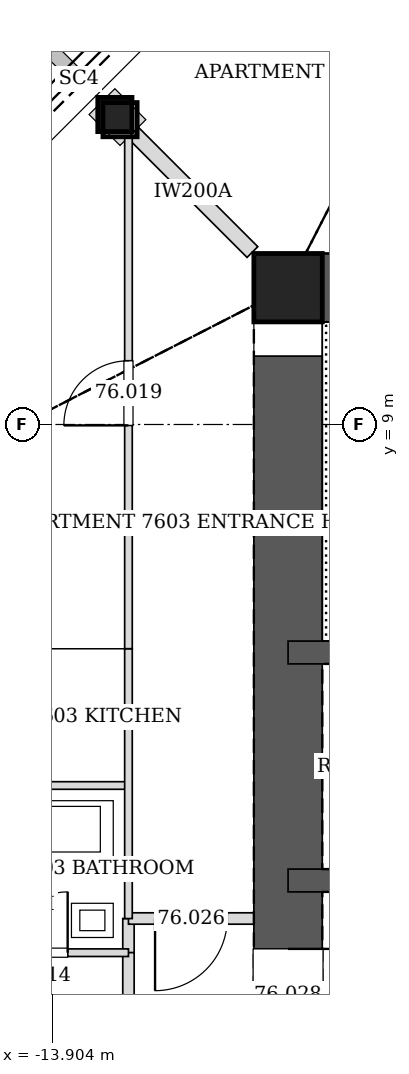
"""IFC4 building model, lengths in metres.
Left out: names, types, materials, properties, quantities, classifications, styles, units other than length and angle.
Written with IfcOpenShell. Run it as: python <this file> out.ifc"""

import sys

from ifc_helpers import new_model, si_unit, direction, frame, frame_2d, origin, origin_2d, place, context, subcontext, project, spatial, rectangle, hollow_rectangle, extrude, element, fill, save


model = new_model("IFC4")
c1 = context("Model", 3, precision=1e-05, world=origin(), true_north=direction((0.0, 1.0)))
c2 = subcontext(c1, "Body", "Model", "MODEL_VIEW")
j1 = project(units=[si_unit("LENGTHUNIT", "METRE"), si_unit("PLANEANGLEUNIT", "RADIAN")], contexts=[c1])
p1 = place(None, origin())
s1 = spatial("IfcSite", under=j1, at=p1, CompositionType="ELEMENT")
p2 = place(p1, origin())
s2 = spatial("IfcBuilding", under=s1, at=p2, CompositionType="ELEMENT")
p3 = place(p2, frame((0.0, 0.0, 308.2)))
s3 = spatial("IfcBuildingStorey", under=s2, at=p3, CompositionType="ELEMENT", Elevation=308.2)
p4 = place(p3, frame((-13.079, 13.079, 0.0), z_axis=(0.020024994503, -0.020024994503, 0.999598919162), x_axis=(0.707106781187, 0.707106781187, 0.0)))
e1 = element("IfcColumn", 1, at=p4, inside=s3, PredefinedType="COLUMN", context=c2, shape_type="SweptSolid", body=[
    extrude(hollow_rectangle(XDim=0.45, YDim=0.45, WallThickness=0.02, at=origin_2d()), origin(), (0.0, 0.0, 1.0), 3.402),
])
p5 = place(p3, frame((-10.8, 10.8, 0.0), z_axis=(0.0, 0.0, 1.0), x_axis=(1.0, 0.0, 0.0)))
e2 = element("IfcColumn", 2, at=p5, inside=s3, PredefinedType="COLUMN", context=c2, shape_type="SweptSolid", body=[
    extrude(hollow_rectangle(XDim=0.9, YDim=0.9, WallThickness=0.04, at=origin_2d()), origin(), (0.0, 0.0, 1.0), 3.4),
])
p6 = place(p3, frame((10.8, 10.8, 0.0), z_axis=(0.0, 0.0, 1.0), x_axis=(-1.0, 0.0, 0.0)))
e3 = element("IfcWall", 3, at=p6, inside=s3, PredefinedType="SOLIDWALL", context=c2, shape_type="SweptSolid", body=[
    extrude(rectangle(XDim=21.6, YDim=0.9, at=frame_2d((10.8, 0.0))), origin(), (0.0, 0.0, 1.0), 3.4),
])
p7 = place(p6, frame((10.05, 0.0, 0.0)))
e4 = element("IfcOpeningElement", 4, at=p7, cuts=e3, PredefinedType="OPENING", context=c2, shape_type="SweptSolid", body=[
    extrude(rectangle(XDim=1.5, YDim=2.1, at=frame_2d((0.75, 1.05))), frame((0.0, 0.46, 0.0), z_axis=(0.0, -1.0, 0.0), x_axis=(1.0, 0.0, 0.0)), (0.0, 0.0, 1.0), 0.92),
])
p8 = place(p3, frame((-10.8, 10.8, 0.0), z_axis=(0.0, 0.0, 1.0), x_axis=(0.0, -1.0, 0.0)))
e5 = element("IfcWall", 5, at=p8, inside=s3, PredefinedType="SOLIDWALL", context=c2, shape_type="SweptSolid", body=[
    extrude(rectangle(XDim=21.6, YDim=0.9, at=frame_2d((10.8, 0.0))), origin(), (0.0, 0.0, 1.0), 3.4),
])
p9 = place(p8, frame((8.7, 0.0, 0.0)))
e6 = element("IfcOpeningElement", 6, at=p9, cuts=e5, PredefinedType="OPENING", context=c2, shape_type="SweptSolid", body=[
    extrude(rectangle(XDim=1.2, YDim=2.1, at=frame_2d((0.6, 1.05))), frame((0.0, 0.46, 0.0), z_axis=(0.0, -1.0, 0.0), x_axis=(1.0, 0.0, 0.0)), (0.0, 0.0, 1.0), 0.92),
])
p10 = place(p8, frame((11.7, 0.0, 0.0)))
e7 = element("IfcOpeningElement", 7, at=p10, cuts=e5, PredefinedType="OPENING", context=c2, shape_type="SweptSolid", body=[
    extrude(rectangle(XDim=1.2, YDim=2.1, at=frame_2d((0.6, 1.05))), frame((0.0, 0.46, 0.0), z_axis=(0.0, -1.0, 0.0), x_axis=(1.0, 0.0, 0.0)), (0.0, 0.0, 1.0), 0.92),
])
p11 = place(p3, frame((-10.8, 3.0, 0.0), z_axis=(0.0, 0.0, 1.0), x_axis=(1.0, 0.0, 0.0)))
e8 = element("IfcWall", 8, at=p11, inside=s3, PredefinedType="SOLIDWALL", context=c2, shape_type="SweptSolid", body=[
    extrude(rectangle(XDim=21.6, YDim=0.3, at=frame_2d((10.8, 0.0))), origin(), (0.0, 0.0, 1.0), 3.4),
])
p12 = place(p11, frame((1.65, 0.0, 0.0)))
e9 = element("IfcOpeningElement", 9, at=p12, cuts=e8, PredefinedType="OPENING", context=c2, shape_type="SweptSolid", body=[
    extrude(rectangle(XDim=0.9, YDim=2.1, at=frame_2d((0.45, 1.05))), frame((0.0, 0.16, 0.0), z_axis=(0.0, -1.0, 0.0), x_axis=(1.0, 0.0, 0.0)), (0.0, 0.0, 1.0), 0.32),
])
p13 = place(p11, frame((4.55, 0.0, 0.0)))
e10 = element("IfcOpeningElement", 10, at=p13, cuts=e8, PredefinedType="OPENING", context=c2, shape_type="SweptSolid", body=[
    extrude(rectangle(XDim=0.9, YDim=2.1, at=frame_2d((0.45, 1.05))), frame((0.0, 0.16, 0.0), z_axis=(0.0, -1.0, 0.0), x_axis=(1.0, 0.0, 0.0)), (0.0, 0.0, 1.0), 0.32),
])
p14 = place(p11, frame((7.45, 0.0, 0.0)))
e11 = element("IfcOpeningElement", 11, at=p14, cuts=e8, PredefinedType="OPENING", context=c2, shape_type="SweptSolid", body=[
    extrude(rectangle(XDim=0.9, YDim=2.1, at=frame_2d((0.45, 1.05))), frame((0.0, 0.16, 0.0), z_axis=(0.0, -1.0, 0.0), x_axis=(1.0, 0.0, 0.0)), (0.0, 0.0, 1.0), 0.32),
])
p15 = place(p11, frame((13.25, 0.0, 0.0)))
e12 = element("IfcOpeningElement", 12, at=p15, cuts=e8, PredefinedType="OPENING", context=c2, shape_type="SweptSolid", body=[
    extrude(rectangle(XDim=0.9, YDim=2.1, at=frame_2d((0.45, 1.05))), frame((0.0, 0.16, 0.0), z_axis=(0.0, -1.0, 0.0), x_axis=(1.0, 0.0, 0.0)), (0.0, 0.0, 1.0), 0.32),
])
p16 = place(p11, frame((16.15, 0.0, 0.0)))
e13 = element("IfcOpeningElement", 13, at=p16, cuts=e8, PredefinedType="OPENING", context=c2, shape_type="SweptSolid", body=[
    extrude(rectangle(XDim=0.9, YDim=2.1, at=frame_2d((0.45, 1.05))), frame((0.0, 0.16, 0.0), z_axis=(0.0, -1.0, 0.0), x_axis=(1.0, 0.0, 0.0)), (0.0, 0.0, 1.0), 0.32),
])
p17 = place(p11, frame((19.05, 0.0, 0.0)))
e14 = element("IfcOpeningElement", 14, at=p17, cuts=e8, PredefinedType="OPENING", context=c2, shape_type="SweptSolid", body=[
    extrude(rectangle(XDim=0.9, YDim=2.1, at=frame_2d((0.45, 1.05))), frame((0.0, 0.16, 0.0), z_axis=(0.0, -1.0, 0.0), x_axis=(1.0, 0.0, 0.0)), (0.0, 0.0, 1.0), 0.32),
])
p18 = place(p3, frame((-10.8, 6.0, 0.0), z_axis=(0.0, 0.0, 1.0), x_axis=(1.0, 0.0, 0.0)))
e15 = element("IfcWall", 15, at=p18, inside=s3, PredefinedType="SOLIDWALL", context=c2, shape_type="SweptSolid", body=[
    extrude(rectangle(XDim=21.6, YDim=0.3, at=frame_2d((10.8, 0.0))), origin(), (0.0, 0.0, 1.0), 3.4),
])
p19 = place(p18, frame((10.25, 0.0, 0.0)))
e16 = element("IfcOpeningElement", 16, at=p19, cuts=e15, PredefinedType="OPENING", context=c2, shape_type="SweptSolid", body=[
    extrude(rectangle(XDim=1.1, YDim=2.1, at=frame_2d((0.55, 1.05))), frame((0.0, 0.16, 0.0), z_axis=(0.0, -1.0, 0.0), x_axis=(1.0, 0.0, 0.0)), (0.0, 0.0, 1.0), 0.32),
])
p20 = place(p3, frame((-12.9, 2.5, 0.0), z_axis=(0.0, 0.0, 1.0), x_axis=(0.0, -1.0, 0.0)))
e17 = element("IfcWall", 17, at=p20, inside=s3, PredefinedType="PARTITIONING", context=c2, shape_type="SweptSolid", body=[
    extrude(rectangle(XDim=0.451, YDim=0.15, at=frame_2d((0.226, 0.0))), origin(), (0.0, 0.0, 1.0), 3.2),
])
p21 = place(p3, frame((-12.9, 2.051, 0.0), z_axis=(0.0, 0.0, 1.0), x_axis=(0.0, -1.0, 0.0)))
e18 = element("IfcWall", 18, at=p21, inside=s3, PredefinedType="PARTITIONING", context=c2, shape_type="SweptSolid", body=[
    extrude(rectangle(XDim=1.869, YDim=0.15, at=frame_2d((0.934, 0.0))), origin(), (0.0, 0.0, 1.0), 3.2),
])
p22 = place(p3, frame((-11.25, 2.5, 0.0), z_axis=(0.0, 0.0, 1.0), x_axis=(-1.0, 0.0, 0.0)))
e19 = element("IfcWall", 19, at=p22, inside=s3, PredefinedType="PARTITIONING", context=c2, shape_type="SweptSolid", body=[
    extrude(rectangle(XDim=1.65, YDim=0.15, at=frame_2d((0.825, 0.0))), origin(), (0.0, 0.0, 1.0), 3.2),
])
p23 = place(p22, frame((0.35, 0.0, 0.0)))
e20 = element("IfcOpeningElement", 20, at=p23, cuts=e19, PredefinedType="OPENING", context=c2, shape_type="SweptSolid", body=[
    extrude(rectangle(XDim=0.95, YDim=2.1, at=frame_2d((0.475, 1.05))), frame((0.0, 0.085, 0.0), z_axis=(0.0, -1.0, 0.0), x_axis=(1.0, 0.0, 0.0)), (0.0, 0.0, 1.0), 0.17),
])
p24 = place(p3, frame((-12.838, 12.838, 0.0), z_axis=(0.0, 0.0, 1.0), x_axis=(0.707106781187, -0.707106781187, 0.0)))
e21 = element("IfcWall", 21, at=p24, inside=s3, PredefinedType="PARTITIONING", context=c2, shape_type="SweptSolid", body=[
    extrude(rectangle(XDim=2.219, YDim=0.2, at=frame_2d((1.109, 0.0))), origin(), (0.0, 0.0, 1.0), 2.591),
])
p25 = place(p3, frame((-15.3, 4.25, 0.0), z_axis=(0.0, 0.0, 1.0), x_axis=(1.0, 0.0, 0.0)))
e22 = element("IfcWall", 22, at=p25, inside=s3, PredefinedType="PARTITIONING", context=c2, shape_type="SweptSolid", body=[
    extrude(rectangle(XDim=2.4, YDim=0.1, at=frame_2d((1.2, 0.0))), origin(), (0.0, 0.0, 1.0), 2.588),
])
p26 = place(p3, frame((-12.9, 6.05, 0.0), z_axis=(0.0, 0.0, 1.0), x_axis=(0.0, -1.0, 0.0)))
e23 = element("IfcWall", 23, at=p26, inside=s3, PredefinedType="PARTITIONING", context=c2, shape_type="SweptSolid", body=[
    extrude(rectangle(XDim=3.551, YDim=0.1, at=frame_2d((1.775, 0.0))), origin(), (0.0, 0.0, 1.0), 3.2),
])
p27 = place(p3, frame((-15.3, 2.05, 0.0), z_axis=(0.0, 0.0, 1.0), x_axis=(1.0, 0.0, 0.0)))
e24 = element("IfcWall", 24, at=p27, inside=s3, PredefinedType="PARTITIONING", context=c2, shape_type="SweptSolid", body=[
    extrude(rectangle(XDim=2.4, YDim=0.1, at=frame_2d((1.2, 0.0))), origin(), (0.0, 0.0, 1.0), 2.588),
])
p28 = place(p27, frame((0.8, 0.0, 0.0)))
e25 = element("IfcOpeningElement", 25, at=p28, cuts=e24, PredefinedType="OPENING", context=c2, shape_type="SweptSolid", body=[
    extrude(rectangle(XDim=0.8, YDim=2.1, at=frame_2d((0.4, 1.05))), frame((0.0, 0.06, 0.0), z_axis=(0.0, -1.0, 0.0), x_axis=(1.0, 0.0, 0.0)), (0.0, 0.0, 1.0), 0.12),
])
p29 = place(p3, frame((-12.9, 6.05, 0.0), z_axis=(0.0, 0.0, 1.0), x_axis=(0.0, 1.0, 0.0)))
e26 = element("IfcWall", 26, at=p29, inside=s3, PredefinedType="PARTITIONING", context=c2, shape_type="SweptSolid", body=[
    extrude(rectangle(XDim=6.726, YDim=0.1, at=frame_2d((3.363, 0.0))), origin(), (0.0, 0.0, 1.0), 2.349),
])
p30 = place(p29, frame((2.938, 0.0, 0.0)))
e27 = element("IfcOpeningElement", 27, at=p30, cuts=e26, PredefinedType="OPENING", context=c2, shape_type="SweptSolid", body=[
    extrude(rectangle(XDim=0.85, YDim=2.1, at=frame_2d((0.425, 1.05))), frame((0.0, 0.06, 0.0), z_axis=(0.0, -1.0, 0.0), x_axis=(1.0, 0.0, 0.0)), (0.0, 0.0, 1.0), 0.12),
])
p31 = place(p28, origin())
e28 = element("IfcDoor", 28, at=p31, inside=s3, OperationType="SINGLE_SWING_RIGHT", PredefinedType="DOOR", context=c2, shape_type="SweptSolid", body=[
    extrude(rectangle(XDim=0.8, YDim=2.1, at=frame_2d((0.4, 1.05))), frame((0.0, 0.025, 0.0), z_axis=(0.0, -1.0, 0.0), x_axis=(1.0, 0.0, 0.0)), (0.0, 0.0, 1.0), 0.05),
])
fill(e25, e28)
p32 = place(p30, origin())
e29 = element("IfcDoor", 29, at=p32, inside=s3, OperationType="SINGLE_SWING_LEFT", PredefinedType="DOOR", context=c2, shape_type="SweptSolid", body=[
    extrude(rectangle(XDim=0.85, YDim=2.1, at=frame_2d((0.425, 1.05))), frame((0.0, 0.025, 0.0), z_axis=(0.0, -1.0, 0.0), x_axis=(1.0, 0.0, 0.0)), (0.0, 0.0, 1.0), 0.05),
])
fill(e27, e29)
p33 = place(p23, origin())
e30 = element("IfcDoor", 30, at=p33, inside=s3, OperationType="SINGLE_SWING_RIGHT", PredefinedType="DOOR", context=c2, shape_type="SweptSolid", body=[
    extrude(rectangle(XDim=0.95, YDim=2.1, at=frame_2d((0.475, 1.05))), frame((0.0, 0.025, 0.0), z_axis=(0.0, -1.0, 0.0), x_axis=(1.0, 0.0, 0.0)), (0.0, 0.0, 1.0), 0.05),
])
fill(e20, e30)
p34 = place(p9, origin())
e31 = element("IfcDoor", 31, at=p34, inside=s3, OperationType="SINGLE_SWING_LEFT", PredefinedType="DOOR", context=c2, shape_type="SweptSolid", body=[
    extrude(rectangle(XDim=1.2, YDim=2.1, at=frame_2d((0.6, 1.05))), frame((0.0, 0.025, 0.0), z_axis=(0.0, -1.0, 0.0), x_axis=(1.0, 0.0, 0.0)), (0.0, 0.0, 1.0), 0.05),
])
fill(e6, e31)
save(model, sys.argv[1])
